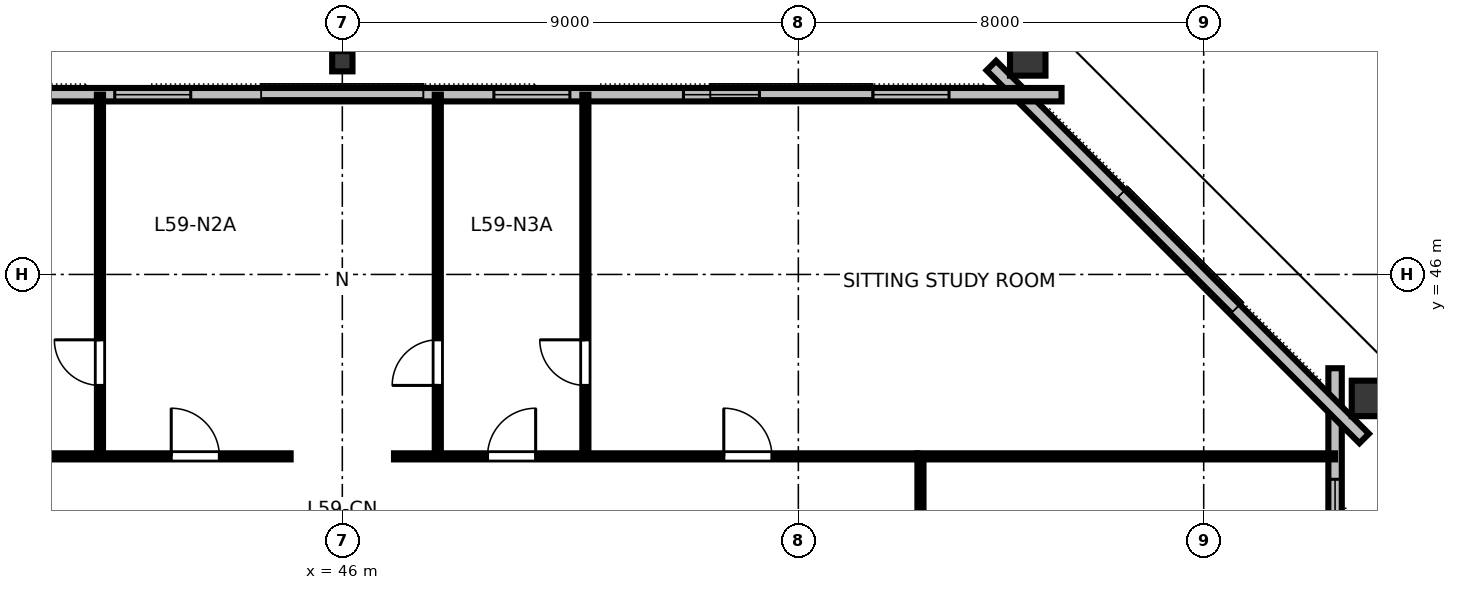
"""IFC4 building model, lengths in metres.
Left out: names, types, materials, properties, quantities, classifications, styles, units other than length and angle.
Written with IfcOpenShell. Run it as: python <this file> out.ifc"""

import sys

from ifc_helpers import new_model, si_unit, direction, frame, frame_2d, origin, origin_2d, place, context, subcontext, project, spatial, rectangle, hollow_rectangle, i_section, extrude, element, fill, save


model = new_model("IFC4")
c1 = context("Model", 3, precision=1e-05, world=origin(), true_north=direction((0.0, 1.0)))
c2 = subcontext(c1, "Body", "Model", "MODEL_VIEW")
j1 = project(units=[si_unit("LENGTHUNIT", "METRE"), si_unit("PLANEANGLEUNIT", "RADIAN")], contexts=[c1])
p1 = place(None, origin())
s1 = spatial("IfcSite", under=j1, at=p1, CompositionType="ELEMENT")
p2 = place(p1, origin())
s2 = spatial("IfcBuilding", under=s1, at=p2, CompositionType="ELEMENT")
p3 = place(p2, frame((0.0, 0.0, 223.8)))
s3 = spatial("IfcBuildingStorey", under=s2, at=p3, CompositionType="ELEMENT", Elevation=223.8)
for number, where, z_axis, x_axis in (
    (1, (66.347, 43.554, 0.0), (0.0, 0.0, 1.0), (0.0, 1.0, 0.0)),
    (2, (59.527, 50.348, 0.0), (0.0, 0.0, 1.0), (1.0, 0.0, 0.0)),
):
    element("IfcColumn", number, at=place(p3, frame(where, z_axis=z_axis, x_axis=x_axis)), inside=s3, PredefinedType="COLUMN", context=c2, shape_type="SweptSolid", body=[
        extrude(hollow_rectangle(XDim=0.7, YDim=0.85, WallThickness=0.04, at=origin_2d()), origin(), (0.0, 0.0, 1.0), 3.373),
    ])
p4 = place(p3, frame((46.0, 50.207, 0.0), z_axis=(0.0, 0.0, 1.0), x_axis=(1.0, 0.0, 0.0)))
e3 = element("IfcColumn", 3, at=p4, inside=s3, PredefinedType="COLUMN", context=c2, shape_type="SweptSolid", body=[
    extrude(i_section(OverallWidth=0.401, OverallDepth=0.399, WebThickness=0.025, FlangeThickness=0.04, FilletRadius=0.025, at=origin_2d()), origin(), (0.0, 0.0, 1.0), 3.373),
])
p5 = place(p3, frame((65.593, 19.851, 0.0), z_axis=(0.0, 0.0, 1.0), x_axis=(0.0, 1.0, 0.0)))
e4 = element("IfcWall", 4, at=p5, inside=s3, PredefinedType="STANDARD", context=c2, shape_type="SweptSolid", body=[
    extrude(rectangle(XDim=24.298, YDim=0.265, at=frame_2d((12.149, 0.0))), origin(), (0.0, 0.0, 1.0), 3.375),
])
p6 = place(p5, frame((13.499, 0.0, 0.0)))
e5 = element("IfcOpeningElement", 5, at=p6, cuts=e4, PredefinedType="OPENING", context=c2, shape_type="SweptSolid", body=[
    extrude(rectangle(XDim=1.4, YDim=2.15, at=frame_2d((0.7, 1.075))), frame((0.0, 0.142, 0.0), z_axis=(0.0, -1.0, 0.0), x_axis=(1.0, 0.0, 0.0)), (0.0, 0.0, 1.0), 0.285),
])
p7 = place(p5, frame((2.191, 0.0, 0.85)))
e6 = element("IfcOpeningElement", 6, at=p7, cuts=e4, PredefinedType="OPENING", context=c2, shape_type="SweptSolid", body=[
    extrude(rectangle(XDim=1.5, YDim=1.85, at=frame_2d((0.75, 0.925))), frame((0.0, 0.142, 0.0), z_axis=(0.0, -1.0, 0.0), x_axis=(1.0, 0.0, 0.0)), (0.0, 0.0, 1.0), 0.285),
])
p8 = place(p5, frame((5.875, 0.0, 0.85)))
e7 = element("IfcOpeningElement", 7, at=p8, cuts=e4, PredefinedType="OPENING", context=c2, shape_type="SweptSolid", body=[
    extrude(rectangle(XDim=1.5, YDim=1.85, at=frame_2d((0.75, 0.925))), frame((0.0, 0.142, 0.0), z_axis=(0.0, -1.0, 0.0), x_axis=(1.0, 0.0, 0.0)), (0.0, 0.0, 1.0), 0.285),
])
p9 = place(p5, frame((9.558, 0.0, 0.85)))
e8 = element("IfcOpeningElement", 8, at=p9, cuts=e4, PredefinedType="OPENING", context=c2, shape_type="SweptSolid", body=[
    extrude(rectangle(XDim=1.5, YDim=1.85, at=frame_2d((0.75, 0.925))), frame((0.0, 0.142, 0.0), z_axis=(0.0, -1.0, 0.0), x_axis=(1.0, 0.0, 0.0)), (0.0, 0.0, 1.0), 0.285),
])
p10 = place(p5, frame((16.924, 0.0, 0.85)))
e9 = element("IfcOpeningElement", 9, at=p10, cuts=e4, PredefinedType="OPENING", context=c2, shape_type="SweptSolid", body=[
    extrude(rectangle(XDim=1.5, YDim=1.85, at=frame_2d((0.75, 0.925))), frame((0.0, 0.142, 0.0), z_axis=(0.0, -1.0, 0.0), x_axis=(1.0, 0.0, 0.0)), (0.0, 0.0, 1.0), 0.285),
])
p11 = place(p5, frame((20.607, 0.0, 0.85)))
e10 = element("IfcOpeningElement", 10, at=p11, cuts=e4, PredefinedType="OPENING", context=c2, shape_type="SweptSolid", body=[
    extrude(rectangle(XDim=1.5, YDim=1.85, at=frame_2d((0.75, 0.925))), frame((0.0, 0.142, 0.0), z_axis=(0.0, -1.0, 0.0), x_axis=(1.0, 0.0, 0.0)), (0.0, 0.0, 1.0), 0.285),
])
p12 = place(p3, frame((66.167, 42.764, 0.0), z_axis=(0.0, 0.0, 1.0), x_axis=(-0.707106781187, 0.707106781187, 0.0)))
e11 = element("IfcWall", 11, at=p12, inside=s3, PredefinedType="STANDARD", context=c2, shape_type="SweptSolid", body=[
    extrude(rectangle(XDim=10.405, YDim=0.265, at=frame_2d((5.203, 0.0))), origin(), (0.0, 0.0, 1.0), 3.375),
])
p13 = place(p3, frame((60.195, 49.547, 0.0), z_axis=(0.0, 0.0, 1.0), x_axis=(-1.0, 0.0, 0.0)))
e12 = element("IfcWall", 12, at=p13, inside=s3, PredefinedType="STANDARD", context=c2, shape_type="SweptSolid", body=[
    extrude(rectangle(XDim=28.389, YDim=0.265, at=frame_2d((14.195, 0.0))), origin(), (0.0, 0.0, 1.0), 3.375),
])
p14 = place(p13, frame((2.221, 0.0, 0.85)))
e13 = element("IfcOpeningElement", 13, at=p14, cuts=e12, PredefinedType="OPENING", context=c2, shape_type="SweptSolid", body=[
    extrude(rectangle(XDim=1.5, YDim=1.85, at=frame_2d((0.75, 0.925))), frame((0.0, 0.142, 0.0), z_axis=(0.0, -1.0, 0.0), x_axis=(1.0, 0.0, 0.0)), (0.0, 0.0, 1.0), 0.285),
])
p15 = place(p13, frame((5.962, 0.0, 0.85)))
e14 = element("IfcOpeningElement", 14, at=p15, cuts=e12, PredefinedType="OPENING", context=c2, shape_type="SweptSolid", body=[
    extrude(rectangle(XDim=1.5, YDim=1.85, at=frame_2d((0.75, 0.925))), frame((0.0, 0.142, 0.0), z_axis=(0.0, -1.0, 0.0), x_axis=(1.0, 0.0, 0.0)), (0.0, 0.0, 1.0), 0.285),
])
p16 = place(p13, frame((9.703, 0.0, 0.85)))
e15 = element("IfcOpeningElement", 15, at=p16, cuts=e12, PredefinedType="OPENING", context=c2, shape_type="SweptSolid", body=[
    extrude(rectangle(XDim=1.5, YDim=1.85, at=frame_2d((0.75, 0.925))), frame((0.0, 0.142, 0.0), z_axis=(0.0, -1.0, 0.0), x_axis=(1.0, 0.0, 0.0)), (0.0, 0.0, 1.0), 0.285),
])
p17 = place(p13, frame((17.186, 0.0, 0.85)))
e16 = element("IfcOpeningElement", 16, at=p17, cuts=e12, PredefinedType="OPENING", context=c2, shape_type="SweptSolid", body=[
    extrude(rectangle(XDim=1.5, YDim=1.85, at=frame_2d((0.75, 0.925))), frame((0.0, 0.142, 0.0), z_axis=(0.0, -1.0, 0.0), x_axis=(1.0, 0.0, 0.0)), (0.0, 0.0, 1.0), 0.285),
])
p18 = place(p13, frame((20.927, 0.0, 0.85)))
e17 = element("IfcOpeningElement", 17, at=p18, cuts=e12, PredefinedType="OPENING", context=c2, shape_type="SweptSolid", body=[
    extrude(rectangle(XDim=1.5, YDim=1.85, at=frame_2d((0.75, 0.925))), frame((0.0, 0.142, 0.0), z_axis=(0.0, -1.0, 0.0), x_axis=(1.0, 0.0, 0.0)), (0.0, 0.0, 1.0), 0.285),
])
p19 = place(p13, frame((24.668, 0.0, 0.85)))
e18 = element("IfcOpeningElement", 18, at=p19, cuts=e12, PredefinedType="OPENING", context=c2, shape_type="SweptSolid", body=[
    extrude(rectangle(XDim=1.5, YDim=1.85, at=frame_2d((0.75, 0.925))), frame((0.0, 0.142, 0.0), z_axis=(0.0, -1.0, 0.0), x_axis=(1.0, 0.0, 0.0)), (0.0, 0.0, 1.0), 0.285),
])
p20 = place(p3, frame((41.217, 42.41, 0.0), z_axis=(0.0, 0.0, 1.0), x_axis=(0.0, 1.0, 0.0)))
e19 = element("IfcWall", 19, at=p20, inside=s3, PredefinedType="PARTITIONING", context=c2, shape_type="SweptSolid", body=[
    extrude(rectangle(XDim=7.137, YDim=0.12, at=frame_2d((3.569, 0.0))), origin(), (0.0, 0.0, 1.0), 2.655),
])
p21 = place(p20, frame((1.4, 0.0, 0.0)))
e20 = element("IfcOpeningElement", 20, at=p21, cuts=e19, PredefinedType="OPENING", context=c2, shape_type="SweptSolid", body=[
    extrude(rectangle(XDim=0.9, YDim=2.15, at=frame_2d((0.45, 1.075))), frame((0.0, 0.07, 0.0), z_axis=(0.0, -1.0, 0.0), x_axis=(1.0, 0.0, 0.0)), (0.0, 0.0, 1.0), 0.14),
])
p22 = place(p3, frame((47.885, 42.41, 0.0), z_axis=(0.0, 0.0, 1.0), x_axis=(0.0, 1.0, 0.0)))
e21 = element("IfcWall", 21, at=p22, inside=s3, PredefinedType="PARTITIONING", context=c2, shape_type="SweptSolid", body=[
    extrude(rectangle(XDim=7.137, YDim=0.12, at=frame_2d((3.569, 0.0))), origin(), (0.0, 0.0, 1.0), 2.655),
])
p23 = place(p22, frame((1.4, 0.0, 0.0)))
e22 = element("IfcOpeningElement", 22, at=p23, cuts=e21, PredefinedType="OPENING", context=c2, shape_type="SweptSolid", body=[
    extrude(rectangle(XDim=0.9, YDim=2.15, at=frame_2d((0.45, 1.075))), frame((0.0, 0.07, 0.0), z_axis=(0.0, -1.0, 0.0), x_axis=(1.0, 0.0, 0.0)), (0.0, 0.0, 1.0), 0.14),
])
p24 = place(p3, frame((50.797, 42.41, 0.0), z_axis=(0.0, 0.0, 1.0), x_axis=(0.0, 1.0, 0.0)))
e23 = element("IfcWall", 23, at=p24, inside=s3, PredefinedType="PARTITIONING", context=c2, shape_type="SweptSolid", body=[
    extrude(rectangle(XDim=7.137, YDim=0.12, at=frame_2d((3.569, 0.0))), origin(), (0.0, 0.0, 1.0), 2.655),
])
p25 = place(p24, frame((1.4, 0.0, 0.0)))
e24 = element("IfcOpeningElement", 24, at=p25, cuts=e23, PredefinedType="OPENING", context=c2, shape_type="SweptSolid", body=[
    extrude(rectangle(XDim=0.9, YDim=2.15, at=frame_2d((0.45, 1.075))), frame((0.0, 0.07, 0.0), z_axis=(0.0, -1.0, 0.0), x_axis=(1.0, 0.0, 0.0)), (0.0, 0.0, 1.0), 0.14),
])
p26 = place(p3, frame((34.65, 42.41, 0.0), z_axis=(0.0, 0.0, 1.0), x_axis=(1.0, 0.0, 0.0)))
e25 = element("IfcWall", 25, at=p26, inside=s3, PredefinedType="PARTITIONING", context=c2, shape_type="SweptSolid", body=[
    extrude(rectangle(XDim=10.33, YDim=0.12, at=frame_2d((5.165, 0.0))), origin(), (0.0, 0.0, 1.0), 2.655),
])
p27 = place(p26, frame((2.878, 0.0, 0.0)))
e26 = element("IfcOpeningElement", 26, at=p27, cuts=e25, PredefinedType="OPENING", context=c2, shape_type="SweptSolid", body=[
    extrude(rectangle(XDim=0.95, YDim=2.15, at=frame_2d((0.475, 1.075))), frame((0.0, 0.07, 0.0), z_axis=(0.0, -1.0, 0.0), x_axis=(1.0, 0.0, 0.0)), (0.0, 0.0, 1.0), 0.14),
])
p28 = place(p26, frame((7.974, 0.0, 0.0)))
e27 = element("IfcOpeningElement", 27, at=p28, cuts=e25, PredefinedType="OPENING", context=c2, shape_type="SweptSolid", body=[
    extrude(rectangle(XDim=0.95, YDim=2.15, at=frame_2d((0.475, 1.075))), frame((0.0, 0.07, 0.0), z_axis=(0.0, -1.0, 0.0), x_axis=(1.0, 0.0, 0.0)), (0.0, 0.0, 1.0), 0.14),
])
p29 = place(p3, frame((47.02, 42.41, 0.0), z_axis=(0.0, 0.0, 1.0), x_axis=(1.0, 0.0, 0.0)))
e28 = element("IfcWall", 28, at=p29, inside=s3, PredefinedType="PARTITIONING", context=c2, shape_type="SweptSolid", body=[
    extrude(rectangle(XDim=10.33, YDim=0.12, at=frame_2d((5.165, 0.0))), origin(), (0.0, 0.0, 1.0), 2.655),
])
p30 = place(p29, frame((1.846, 0.0, 0.0)))
e29 = element("IfcOpeningElement", 29, at=p30, cuts=e28, PredefinedType="OPENING", context=c2, shape_type="SweptSolid", body=[
    extrude(rectangle(XDim=0.95, YDim=2.15, at=frame_2d((0.475, 1.075))), frame((0.0, 0.07, 0.0), z_axis=(0.0, -1.0, 0.0), x_axis=(1.0, 0.0, 0.0)), (0.0, 0.0, 1.0), 0.14),
])
p31 = place(p29, frame((6.509, 0.0, 0.0)))
e30 = element("IfcOpeningElement", 30, at=p31, cuts=e28, PredefinedType="OPENING", context=c2, shape_type="SweptSolid", body=[
    extrude(rectangle(XDim=0.95, YDim=2.15, at=frame_2d((0.475, 1.075))), frame((0.0, 0.07, 0.0), z_axis=(0.0, -1.0, 0.0), x_axis=(1.0, 0.0, 0.0)), (0.0, 0.0, 1.0), 0.14),
])
p32 = place(p3, frame((57.41, 21.65, 0.0), z_axis=(0.0, 0.0, 1.0), x_axis=(0.0, 1.0, 0.0)))
e31 = element("IfcWall", 31, at=p32, inside=s3, PredefinedType="PARTITIONING", context=c2, shape_type="SweptSolid", body=[
    extrude(rectangle(XDim=20.7, YDim=0.12, at=frame_2d((10.35, 0.0))), origin(), (0.0, 0.0, 1.0), 2.655),
])
p33 = place(p32, frame((9.875, 0.0, 0.0)))
e32 = element("IfcOpeningElement", 32, at=p33, cuts=e31, PredefinedType="OPENING", context=c2, shape_type="SweptSolid", body=[
    extrude(rectangle(XDim=0.95, YDim=2.15, at=frame_2d((0.475, 1.075))), frame((0.0, 0.07, 0.0), z_axis=(0.0, -1.0, 0.0), x_axis=(1.0, 0.0, 0.0)), (0.0, 0.0, 1.0), 0.14),
])
p34 = place(p3, frame((57.35, 42.41, 0.0), z_axis=(0.0, 0.0, 1.0), x_axis=(1.0, 0.0, 0.0)))
e33 = element("IfcWall", 33, at=p34, inside=s3, PredefinedType="PARTITIONING", context=c2, shape_type="SweptSolid", body=[
    extrude(rectangle(XDim=8.243, YDim=0.12, at=frame_2d((4.121, 0.0))), origin(), (0.0, 0.0, 1.0), 2.655),
])
p35 = place(p11, origin())
e34 = element("IfcWindow", 34, at=p35, inside=s3, PartitioningType="SINGLE_PANEL", PredefinedType="WINDOW", context=c2, shape_type="SweptSolid", body=[
    extrude(rectangle(XDim=1.5, YDim=1.85, at=frame_2d((0.75, 0.925))), frame((0.0, 0.03, 0.0), z_axis=(0.0, -1.0, 0.0), x_axis=(1.0, 0.0, 0.0)), (0.0, 0.0, 1.0), 0.06),
])
fill(e10, e34)
p36 = place(p14, origin())
e35 = element("IfcWindow", 35, at=p36, inside=s3, PartitioningType="SINGLE_PANEL", PredefinedType="WINDOW", context=c2, shape_type="SweptSolid", body=[
    extrude(rectangle(XDim=1.5, YDim=1.85, at=frame_2d((0.75, 0.925))), frame((0.0, 0.03, 0.0), z_axis=(0.0, -1.0, 0.0), x_axis=(1.0, 0.0, 0.0)), (0.0, 0.0, 1.0), 0.06),
])
fill(e13, e35)
p37 = place(p15, origin())
e36 = element("IfcWindow", 36, at=p37, inside=s3, PartitioningType="SINGLE_PANEL", PredefinedType="WINDOW", context=c2, shape_type="SweptSolid", body=[
    extrude(rectangle(XDim=1.5, YDim=1.85, at=frame_2d((0.75, 0.925))), frame((0.0, 0.03, 0.0), z_axis=(0.0, -1.0, 0.0), x_axis=(1.0, 0.0, 0.0)), (0.0, 0.0, 1.0), 0.06),
])
fill(e14, e36)
p38 = place(p16, origin())
e37 = element("IfcWindow", 37, at=p38, inside=s3, PartitioningType="SINGLE_PANEL", PredefinedType="WINDOW", context=c2, shape_type="SweptSolid", body=[
    extrude(rectangle(XDim=1.5, YDim=1.85, at=frame_2d((0.75, 0.925))), frame((0.0, 0.03, 0.0), z_axis=(0.0, -1.0, 0.0), x_axis=(1.0, 0.0, 0.0)), (0.0, 0.0, 1.0), 0.06),
])
fill(e15, e37)
p39 = place(p17, origin())
e38 = element("IfcWindow", 38, at=p39, inside=s3, PartitioningType="SINGLE_PANEL", PredefinedType="WINDOW", context=c2, shape_type="SweptSolid", body=[
    extrude(rectangle(XDim=1.5, YDim=1.85, at=frame_2d((0.75, 0.925))), frame((0.0, 0.03, 0.0), z_axis=(0.0, -1.0, 0.0), x_axis=(1.0, 0.0, 0.0)), (0.0, 0.0, 1.0), 0.06),
])
fill(e16, e38)
p40 = place(p21, origin())
e39 = element("IfcDoor", 39, at=p40, inside=s3, OperationType="SINGLE_SWING_RIGHT", PredefinedType="DOOR", context=c2, shape_type="SweptSolid", body=[
    extrude(rectangle(XDim=0.9, YDim=2.15, at=frame_2d((0.45, 1.075))), frame((0.0, 0.025, 0.0), z_axis=(0.0, -1.0, 0.0), x_axis=(1.0, 0.0, 0.0)), (0.0, 0.0, 1.0), 0.05),
])
fill(e20, e39)
p41 = place(p23, origin())
e40 = element("IfcDoor", 40, at=p41, inside=s3, OperationType="SINGLE_SWING_LEFT", PredefinedType="DOOR", context=c2, shape_type="SweptSolid", body=[
    extrude(rectangle(XDim=0.9, YDim=2.15, at=frame_2d((0.45, 1.075))), frame((0.0, 0.025, 0.0), z_axis=(0.0, -1.0, 0.0), x_axis=(1.0, 0.0, 0.0)), (0.0, 0.0, 1.0), 0.05),
])
fill(e22, e40)
p42 = place(p25, origin())
e41 = element("IfcDoor", 41, at=p42, inside=s3, OperationType="SINGLE_SWING_RIGHT", PredefinedType="DOOR", context=c2, shape_type="SweptSolid", body=[
    extrude(rectangle(XDim=0.9, YDim=2.15, at=frame_2d((0.45, 1.075))), frame((0.0, 0.025, 0.0), z_axis=(0.0, -1.0, 0.0), x_axis=(1.0, 0.0, 0.0)), (0.0, 0.0, 1.0), 0.05),
])
fill(e24, e41)
p43 = place(p28, origin())
e42 = element("IfcDoor", 42, at=p43, inside=s3, OperationType="SINGLE_SWING_LEFT", PredefinedType="DOOR", context=c2, shape_type="SweptSolid", body=[
    extrude(rectangle(XDim=0.95, YDim=2.15, at=frame_2d((0.475, 1.075))), frame((0.0, 0.025, 0.0), z_axis=(0.0, -1.0, 0.0), x_axis=(1.0, 0.0, 0.0)), (0.0, 0.0, 1.0), 0.05),
])
fill(e27, e42)
p44 = place(p30, origin())
e43 = element("IfcDoor", 43, at=p44, inside=s3, OperationType="SINGLE_SWING_RIGHT", PredefinedType="DOOR", context=c2, shape_type="SweptSolid", body=[
    extrude(rectangle(XDim=0.95, YDim=2.15, at=frame_2d((0.475, 1.075))), frame((0.0, 0.025, 0.0), z_axis=(0.0, -1.0, 0.0), x_axis=(1.0, 0.0, 0.0)), (0.0, 0.0, 1.0), 0.05),
])
fill(e29, e43)
p45 = place(p31, origin())
e44 = element("IfcDoor", 44, at=p45, inside=s3, OperationType="SINGLE_SWING_LEFT", PredefinedType="DOOR", context=c2, shape_type="SweptSolid", body=[
    extrude(rectangle(XDim=0.95, YDim=2.15, at=frame_2d((0.475, 1.075))), frame((0.0, 0.025, 0.0), z_axis=(0.0, -1.0, 0.0), x_axis=(1.0, 0.0, 0.0)), (0.0, 0.0, 1.0), 0.05),
])
fill(e30, e44)
save(model, sys.argv[1])
